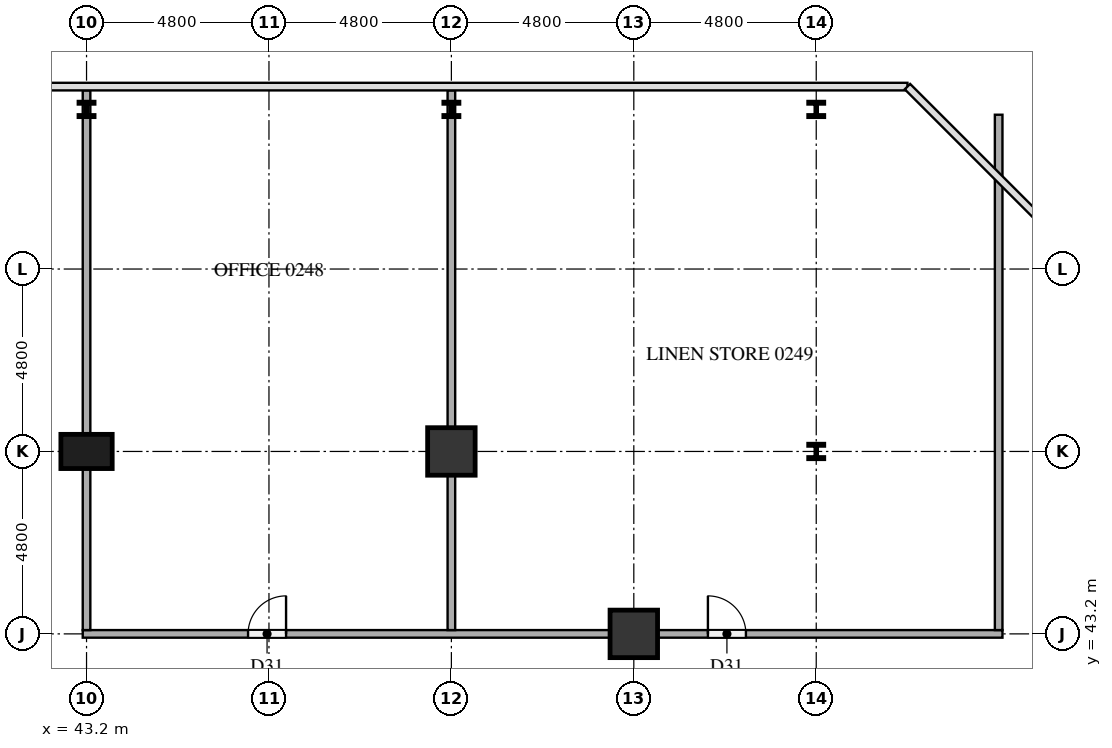
"""IFC4 building model, lengths in metres.
Left out: names, types, materials, properties, quantities, classifications, styles, units other than length and angle.
Written with IfcOpenShell. Run it as: python <this file> out.ifc"""

import sys

from ifc_helpers import new_model, si_unit, direction, frame, frame_2d, origin, origin_2d, place, context, subcontext, project, spatial, rectangle, i_section, extrude, element, fill, save


model = new_model("IFC4")
c1 = context("Model", 3, precision=1e-05, world=origin(), true_north=direction((0.0, 1.0)))
c2 = subcontext(c1, "Body", "Model", "MODEL_VIEW")
j1 = project(units=[si_unit("LENGTHUNIT", "METRE"), si_unit("PLANEANGLEUNIT", "RADIAN")], contexts=[c1])
p1 = place(None, origin())
s1 = spatial("IfcSite", under=j1, at=p1, CompositionType="ELEMENT")
p2 = place(p1, origin())
s2 = spatial("IfcBuilding", under=s1, at=p2, CompositionType="ELEMENT")
p3 = place(p2, frame((0.0, 0.0, 10.5)))
s3 = spatial("IfcBuildingStorey", under=s2, at=p3, CompositionType="ELEMENT", Elevation=10.5)
for number, where, z_axis, x_axis in (
    (1, (57.6, 43.2, 0.0), (0.0, 0.0, 1.0), (1.0, 0.0, 0.0)),
    (2, (52.8, 48.0, 0.0), (0.0, 0.0, 1.0), (1.0, 0.0, 0.0)),
):
    element("IfcColumn", number, at=place(p3, frame(where, z_axis=z_axis, x_axis=x_axis)), inside=s3, PredefinedType="COLUMN", context=c2, shape_type="SweptSolid", body=[
        extrude(rectangle(XDim=1.25, YDim=1.25, at=origin_2d()), origin(), (0.0, 0.0, 1.0), 4.2),
    ])
p4 = place(p3, frame((43.2, 48.0, 0.0), z_axis=(0.0, 0.0, 1.0), x_axis=(1.0, 0.0, 0.0)))
e3 = element("IfcColumn", 3, at=p4, inside=s3, PredefinedType="COLUMN", context=c2, shape_type="SweptSolid", body=[
    extrude(rectangle(XDim=1.35, YDim=0.9, at=origin_2d()), origin(), (0.0, 0.0, 1.0), 4.2),
])
for number, where, z_axis, x_axis in (
    (4, (43.2, 57.0, 0.0), (0.0, 0.0, 1.0), (1.0, 0.0, 0.0)),
    (5, (52.8, 57.0, 0.0), (0.0, 0.0, 1.0), (1.0, 0.0, 0.0)),
    (6, (62.4, 48.0, 0.0), (0.0, 0.0, 1.0), (1.0, 0.0, 0.0)),
    (7, (62.4, 57.0, 0.0), (0.0, 0.0, 1.0), (1.0, 0.0, 0.0)),
):
    element("IfcColumn", number, at=place(p3, frame(where, z_axis=z_axis, x_axis=x_axis)), inside=s3, PredefinedType="COLUMN", context=c2, shape_type="SweptSolid", body=[
        extrude(i_section(OverallWidth=0.396, OverallDepth=0.381, WebThickness=0.019, FlangeThickness=0.03, at=origin_2d()), origin(), (0.0, 0.0, 1.0), 4.2),
    ])
p5 = place(p3, frame((43.1, 43.2, 0.0), z_axis=(0.0, 0.0, 1.0), x_axis=(1.0, 0.0, 0.0)))
e8 = element("IfcWall", 8, at=p5, inside=s3, PredefinedType="PARTITIONING", context=c2, shape_type="SweptSolid", body=[
    extrude(rectangle(XDim=24.2, YDim=0.2, at=frame_2d((12.1, 0.0))), origin(), (0.0, 0.0, 1.0), 4.2),
])
p6 = place(p5, frame((4.35, 0.0, 0.0)))
e9 = element("IfcOpeningElement", 9, at=p6, cuts=e8, PredefinedType="OPENING", context=c2, shape_type="SweptSolid", body=[
    extrude(rectangle(XDim=1.0, YDim=2.1, at=frame_2d((0.5, 1.05))), frame((0.0, 0.11, 0.0), z_axis=(0.0, -1.0, 0.0), x_axis=(1.0, 0.0, 0.0)), (0.0, 0.0, 1.0), 0.22),
])
p7 = place(p5, frame((16.45, 0.0, 0.0)))
e10 = element("IfcOpeningElement", 10, at=p7, cuts=e8, PredefinedType="OPENING", context=c2, shape_type="SweptSolid", body=[
    extrude(rectangle(XDim=1.0, YDim=2.1, at=frame_2d((0.5, 1.05))), frame((0.0, 0.11, 0.0), z_axis=(0.0, -1.0, 0.0), x_axis=(1.0, 0.0, 0.0)), (0.0, 0.0, 1.0), 0.22),
])
for number, where, z_axis, x_axis in (
    (11, (43.2, 43.3, 0.0), (0.0, 0.0, 1.0), (0.0, 1.0, 0.0)),
    (12, (52.8, 43.3, 0.0), (0.0, 0.0, 1.0), (0.0, 1.0, 0.0)),
):
    element("IfcWall", number, at=place(p3, frame(where, z_axis=z_axis, x_axis=x_axis)), inside=s3, PredefinedType="PARTITIONING", context=c2, shape_type="SweptSolid", body=[
        extrude(rectangle(XDim=14.2, YDim=0.2, at=frame_2d((7.1, 0.0))), origin(), (0.0, 0.0, 1.0), 4.2),
    ])
p8 = place(p3, frame((67.2, 43.3, 0.0), z_axis=(0.0, 0.0, 1.0), x_axis=(0.0, 1.0, 0.0)))
e13 = element("IfcWall", 13, at=p8, inside=s3, PredefinedType="PARTITIONING", context=c2, shape_type="SweptSolid", body=[
    extrude(rectangle(XDim=13.56, YDim=0.2, at=frame_2d((6.78, 0.0))), origin(), (0.0, 0.0, 1.0), 4.2),
])
p9 = place(p6, origin())
e14 = element("IfcDoor", 14, at=p9, inside=s3, OperationType="SINGLE_SWING_RIGHT", PredefinedType="DOOR", context=c2, shape_type="SweptSolid", body=[
    extrude(rectangle(XDim=1.0, YDim=2.1, at=frame_2d((0.5, 1.05))), frame((0.0, 0.025, 0.0), z_axis=(0.0, -1.0, 0.0), x_axis=(1.0, 0.0, 0.0)), (0.0, 0.0, 1.0), 0.05),
])
fill(e9, e14)
p10 = place(p7, origin())
e15 = element("IfcDoor", 15, at=p10, inside=s3, OperationType="SINGLE_SWING_LEFT", PredefinedType="DOOR", context=c2, shape_type="SweptSolid", body=[
    extrude(rectangle(XDim=1.0, YDim=2.1, at=frame_2d((0.5, 1.05))), frame((0.0, 0.025, 0.0), z_axis=(0.0, -1.0, 0.0), x_axis=(1.0, 0.0, 0.0)), (0.0, 0.0, 1.0), 0.05),
])
fill(e10, e15)
save(model, sys.argv[1])
